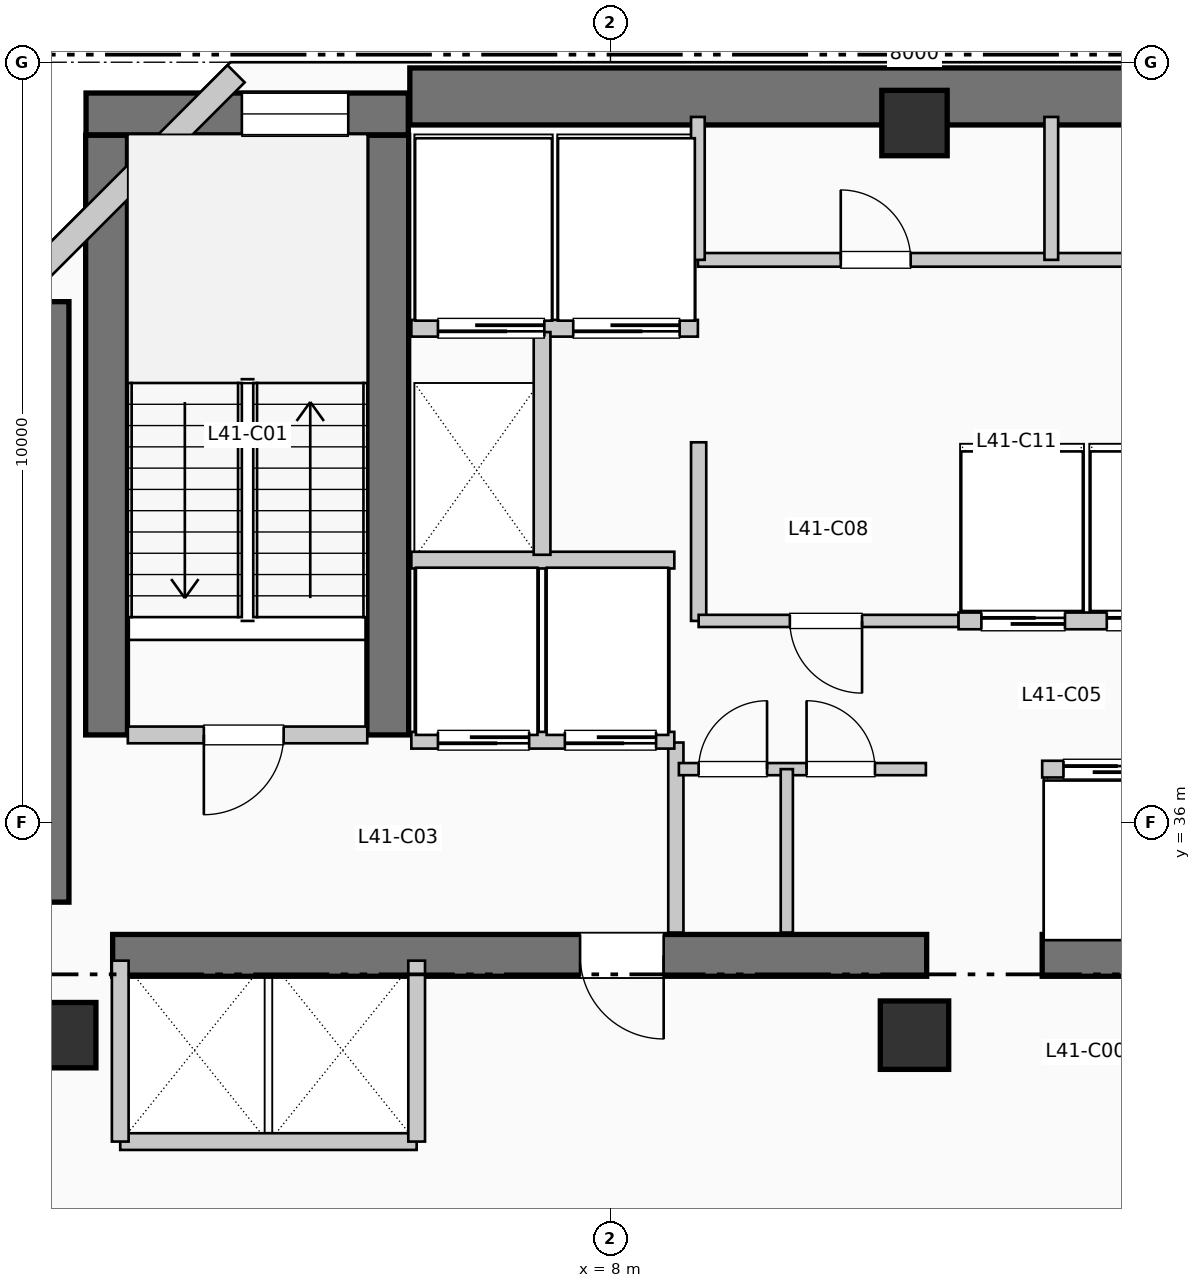
"""IFC4 building model, lengths in metres.
Left out: names, types, materials, properties, quantities, classifications, styles, units other than length and angle.
Written with IfcOpenShell. Run it as: python <this file> out.ifc"""

import sys

from ifc_helpers import new_model, si_unit, direction, frame, frame_2d, origin, origin_2d, place, context, subcontext, project, spatial, rectangle, extrude, element, fill, save


model = new_model("IFC4")
c1 = context("Model", 3, precision=1e-05, world=origin(), true_north=direction((0.0, 1.0)))
c2 = subcontext(c1, "Body", "Model", "MODEL_VIEW")
j1 = project(units=[si_unit("LENGTHUNIT", "METRE"), si_unit("PLANEANGLEUNIT", "RADIAN")], contexts=[c1])
p1 = place(None, origin())
s1 = spatial("IfcSite", under=j1, at=p1, CompositionType="ELEMENT")
p2 = place(p1, origin())
s2 = spatial("IfcBuilding", under=s1, at=p2, CompositionType="ELEMENT")
p3 = place(p2, frame((0.0, 0.0, 170.61)))
s3 = spatial("IfcBuildingStorey", under=s2, at=p3, CompositionType="ELEMENT", Elevation=170.61)
p4 = place(p3, frame((5.36, 45.55, 0.0), z_axis=(0.0, 0.0, 1.0), x_axis=(1.0, 0.0, 0.0)))
e1 = element("IfcWall", 1, at=p4, inside=s3, PredefinedType="SHEAR", context=c2, shape_type="SweptSolid", body=[
    extrude(rectangle(XDim=13.98, YDim=0.75, at=frame_2d((6.99, 0.0))), origin(), (0.0, 0.0, 1.0), 3.96),
])
p5 = place(p3, frame((0.5, 34.95, 0.0), z_axis=(0.0, 0.0, 1.0), x_axis=(0.0, 1.0, 0.0)))
e2 = element("IfcWall", 2, at=p5, inside=s3, PredefinedType="SHEAR", context=c2, shape_type="SweptSolid", body=[
    extrude(rectangle(XDim=7.9, YDim=0.75, at=frame_2d((3.95, 0.0))), origin(), (0.0, 0.0, 1.0), 3.96),
])
p6 = place(p3, frame((1.45, 34.25, 0.0), z_axis=(0.0, 0.0, 1.0), x_axis=(1.0, 0.0, 0.0)))
e3 = element("IfcWall", 3, at=p6, inside=s3, PredefinedType="SHEAR", context=c2, shape_type="SweptSolid", body=[
    extrude(rectangle(XDim=10.71, YDim=0.55, at=frame_2d((5.355, 0.0))), origin(), (0.0, 0.0, 1.0), 3.96),
])
p7 = place(p6, frame((7.25, 0.0, 0.0), z_axis=(0.0, 0.0, 1.0), x_axis=(-1.0, 0.0, 0.0)))
e4 = element("IfcOpeningElement", 4, at=p7, cuts=e3, PredefinedType="OPENING", context=c2, shape_type="SweptSolid", body=[
    extrude(rectangle(XDim=1.1, YDim=2.15, at=frame_2d((0.55, 1.075))), frame((0.0, 0.285, 0.0), z_axis=(0.0, -1.0, 0.0), x_axis=(1.0, 0.0, 0.0)), (0.0, 0.0, 1.0), 0.57),
])
p8 = place(p3, frame((13.68, 34.25, 0.0), z_axis=(0.0, 0.0, 1.0), x_axis=(1.0, 0.0, 0.0)))
e5 = element("IfcWall", 5, at=p8, inside=s3, PredefinedType="SHEAR", context=c2, shape_type="SweptSolid", body=[
    extrude(rectangle(XDim=6.12, YDim=0.55, at=frame_2d((3.06, 0.0))), origin(), (0.0, 0.0, 1.0), 3.96),
])
for number, where, z_axis, x_axis in (
    (6, (1.37, 37.15, 0.0), (0.0, 0.0, 1.0), (0.0, 1.0, 0.0)),
    (7, (5.07, 37.15, 0.0), (0.0, 0.0, 1.0), (0.0, 1.0, 0.0)),
):
    element("IfcWall", number, at=place(p3, frame(where, z_axis=z_axis, x_axis=x_axis)), inside=s3, PredefinedType="SHEAR", context=c2, shape_type="SweptSolid", body=[
        extrude(rectangle(XDim=7.89, YDim=0.55, at=frame_2d((3.945, 0.0))), origin(), (0.0, 0.0, 1.0), 3.96),
    ])
p9 = place(p3, frame((1.1, 45.32, 0.0), z_axis=(0.0, 0.0, 1.0), x_axis=(1.0, 0.0, 0.0)))
e8 = element("IfcWall", 8, at=p9, inside=s3, PredefinedType="SHEAR", context=c2, shape_type="SweptSolid", body=[
    extrude(rectangle(XDim=4.24, YDim=0.55, at=frame_2d((2.12, 0.0))), origin(), (0.0, 0.0, 1.0), 3.96),
])
p10 = place(p9, frame((2.05, 0.0, 1.05)))
e9 = element("IfcOpeningElement", 9, at=p10, cuts=e8, PredefinedType="OPENING", context=c2, shape_type="SweptSolid", body=[
    extrude(rectangle(XDim=1.4, YDim=1.8, at=frame_2d((0.7, 0.9))), frame((0.0, 0.285, 0.0), z_axis=(0.0, -1.0, 0.0), x_axis=(1.0, 0.0, 0.0)), (0.0, 0.0, 1.0), 0.57),
])
p11 = place(p3, frame((0.8, 33.2, 0.0), z_axis=(0.0, 0.0, 1.0), x_axis=(1.0, 0.0, 0.0)))
e10 = element("IfcColumn", 10, at=p11, inside=s3, PredefinedType="COLUMN", context=c2, shape_type="SweptSolid", body=[
    extrude(rectangle(XDim=0.86, YDim=0.86, at=origin_2d()), origin(), (0.0, 0.0, 1.0), 3.96),
])
p12 = place(p3, frame((12.0, 33.2, 0.0), z_axis=(0.0, 0.0, 1.0), x_axis=(1.0, 0.0, 0.0)))
e11 = element("IfcColumn", 11, at=p12, inside=s3, PredefinedType="COLUMN", context=c2, shape_type="SweptSolid", body=[
    extrude(rectangle(XDim=0.9, YDim=0.9, at=origin_2d()), origin(), (0.0, 0.0, 1.0), 3.96),
])
p13 = place(p3, frame((12.0, 45.2, 0.0), z_axis=(0.0, 0.0, 1.0), x_axis=(1.0, 0.0, 0.0)))
e12 = element("IfcColumn", 12, at=p13, inside=s3, PredefinedType="COLUMN", context=c2, shape_type="SweptSolid", body=[
    extrude(rectangle(XDim=0.86, YDim=0.86, at=origin_2d()), origin(), (0.0, 0.0, 1.0), 3.96),
])
p14 = place(p3, frame((3.074, 45.848, 0.0), z_axis=(0.0, 0.0, 1.0), x_axis=(-0.707106781187, -0.707106781187, 0.0)))
e13 = element("IfcWall", 13, at=p14, inside=s3, PredefinedType="SOLIDWALL", context=c2, shape_type="SweptSolid", body=[
    extrude(rectangle(XDim=4.133, YDim=0.32, at=frame_2d((2.066, 0.0))), origin(), (0.0, 0.0, 1.0), 3.61),
])
p15 = place(p3, frame((1.65, 37.15, 0.0), z_axis=(0.0, 0.0, 1.0), x_axis=(1.0, 0.0, 0.0)))
e14 = element("IfcWall", 14, at=p15, inside=s3, PredefinedType="PARTITIONING", context=c2, shape_type="SweptSolid", body=[
    extrude(rectangle(XDim=3.15, YDim=0.22, at=frame_2d((1.575, 0.0))), origin(), (0.0, 0.0, 1.0), 3.61),
])
p16 = place(p15, frame((2.05, 0.0, 0.0), z_axis=(0.0, 0.0, 1.0), x_axis=(-1.0, 0.0, 0.0)))
e15 = element("IfcOpeningElement", 15, at=p16, cuts=e14, PredefinedType="OPENING", context=c2, shape_type="SweptSolid", body=[
    extrude(rectangle(XDim=1.05, YDim=2.15, at=frame_2d((0.525, 1.075))), frame((0.0, 0.12, 0.0), z_axis=(0.0, -1.0, 0.0), x_axis=(1.0, 0.0, 0.0)), (0.0, 0.0, 1.0), 0.24),
])
p17 = place(p3, frame((8.86, 34.55, 0.0), z_axis=(0.0, 0.0, 1.0), x_axis=(0.0, 1.0, 0.0)))
e16 = element("IfcWall", 16, at=p17, inside=s3, PredefinedType="PARTITIONING", context=c2, shape_type="SweptSolid", body=[
    extrude(rectangle(XDim=2.5, YDim=0.2, at=frame_2d((1.25, 0.0))), origin(), (0.0, 0.0, 1.0), 3.61),
])
p18 = place(p3, frame((5.38, 37.08, 0.0), z_axis=(0.0, 0.0, 1.0), x_axis=(1.0, 0.0, 0.0)))
e17 = element("IfcWall", 17, at=p18, inside=s3, PredefinedType="PARTITIONING", context=c2, shape_type="SweptSolid", body=[
    extrude(rectangle(XDim=3.46, YDim=0.22, at=frame_2d((1.73, 0.0))), origin(), (0.0, 0.0, 1.0), 3.61),
])
p19 = place(p18, frame((1.55, 0.0, 0.0), z_axis=(0.0, 0.0, 1.0), x_axis=(-1.0, 0.0, 0.0)))
e18 = element("IfcOpeningElement", 18, at=p19, cuts=e17, PredefinedType="OPENING", context=c2, shape_type="SweptSolid", body=[
    extrude(rectangle(XDim=1.2, YDim=2.2, at=frame_2d((0.6, 1.1))), frame((0.0, 0.12, 0.0), z_axis=(0.0, -1.0, 0.0), x_axis=(1.0, 0.0, 0.0)), (0.0, 0.0, 1.0), 0.24),
])
p20 = place(p18, frame((3.22, 0.0, 0.0), z_axis=(0.0, 0.0, 1.0), x_axis=(-1.0, 0.0, 0.0)))
e19 = element("IfcOpeningElement", 19, at=p20, cuts=e17, PredefinedType="OPENING", context=c2, shape_type="SweptSolid", body=[
    extrude(rectangle(XDim=1.2, YDim=2.2, at=frame_2d((0.6, 1.1))), frame((0.0, 0.12, 0.0), z_axis=(0.0, -1.0, 0.0), x_axis=(1.0, 0.0, 0.0)), (0.0, 0.0, 1.0), 0.24),
])
p21 = place(p3, frame((5.38, 39.45, 0.0), z_axis=(0.0, 0.0, 1.0), x_axis=(1.0, 0.0, 0.0)))
e20 = element("IfcWall", 20, at=p21, inside=s3, PredefinedType="PARTITIONING", context=c2, shape_type="SweptSolid", body=[
    extrude(rectangle(XDim=3.46, YDim=0.22, at=frame_2d((1.73, 0.0))), origin(), (0.0, 0.0, 1.0), 3.61),
])
p22 = place(p3, frame((5.38, 42.5, 0.0), z_axis=(0.0, 0.0, 1.0), x_axis=(1.0, 0.0, 0.0)))
e21 = element("IfcWall", 21, at=p22, inside=s3, PredefinedType="PARTITIONING", context=c2, shape_type="SweptSolid", body=[
    extrude(rectangle(XDim=3.77, YDim=0.22, at=frame_2d((1.885, 0.0))), origin(), (0.0, 0.0, 1.0), 3.61),
])
p23 = place(p22, frame((1.75, 0.0, 0.0), z_axis=(0.0, 0.0, 1.0), x_axis=(-1.0, 0.0, 0.0)))
e22 = element("IfcOpeningElement", 22, at=p23, cuts=e21, PredefinedType="OPENING", context=c2, shape_type="SweptSolid", body=[
    extrude(rectangle(XDim=1.4, YDim=2.2, at=frame_2d((0.7, 1.1))), frame((0.0, 0.12, 0.0), z_axis=(0.0, -1.0, 0.0), x_axis=(1.0, 0.0, 0.0)), (0.0, 0.0, 1.0), 0.24),
])
p24 = place(p22, frame((3.53, 0.0, 0.0), z_axis=(0.0, 0.0, 1.0), x_axis=(-1.0, 0.0, 0.0)))
e23 = element("IfcOpeningElement", 23, at=p24, cuts=e21, PredefinedType="OPENING", context=c2, shape_type="SweptSolid", body=[
    extrude(rectangle(XDim=1.4, YDim=2.2, at=frame_2d((0.7, 1.1))), frame((0.0, 0.12, 0.0), z_axis=(0.0, -1.0, 0.0), x_axis=(1.0, 0.0, 0.0)), (0.0, 0.0, 1.0), 0.24),
])
p25 = place(p3, frame((7.1, 39.52, 0.0), z_axis=(0.0, 0.0, 1.0), x_axis=(0.0, 1.0, 0.0)))
e24 = element("IfcWall", 24, at=p25, inside=s3, PredefinedType="PARTITIONING", context=c2, shape_type="SweptSolid", body=[
    extrude(rectangle(XDim=2.93, YDim=0.22, at=frame_2d((1.465, 0.0))), origin(), (0.0, 0.0, 1.0), 3.61),
])
p26 = place(p3, frame((1.55, 31.8, 0.0), z_axis=(0.0, 0.0, 1.0), x_axis=(1.0, 0.0, 0.0)))
e25 = element("IfcWall", 25, at=p26, inside=s3, PredefinedType="PARTITIONING", context=c2, shape_type="SweptSolid", body=[
    extrude(rectangle(XDim=3.9, YDim=0.22, at=frame_2d((1.95, 0.0))), origin(), (0.0, 0.0, 1.0), 3.61),
])
for number, where, z_axis, x_axis in (
    (26, (1.55, 31.8, 0.0), (0.0, 0.0, 1.0), (0.0, 1.0, 0.0)),
    (27, (5.45, 31.8, 0.0), (0.0, 0.0, 1.0), (0.0, 1.0, 0.0)),
):
    element("IfcWall", number, at=place(p3, frame(where, z_axis=z_axis, x_axis=x_axis)), inside=s3, PredefinedType="PARTITIONING", context=c2, shape_type="SweptSolid", body=[
        extrude(rectangle(XDim=2.38, YDim=0.22, at=frame_2d((1.19, 0.0))), origin(), (0.0, 0.0, 1.0), 3.61),
    ])
p27 = place(p3, frame((9.16, 38.65, 0.0), z_axis=(0.0, 0.0, 1.0), x_axis=(0.0, 1.0, 0.0)))
e28 = element("IfcWall", 28, at=p27, inside=s3, PredefinedType="PARTITIONING", context=c2, shape_type="SweptSolid", body=[
    extrude(rectangle(XDim=2.35, YDim=0.2, at=frame_2d((1.175, 0.0))), origin(), (0.0, 0.0, 1.0), 3.61),
])
p28 = place(p3, frame((8.9, 36.7, 0.0), z_axis=(0.0, 0.0, 1.0), x_axis=(1.0, 0.0, 0.0)))
e29 = element("IfcWall", 29, at=p28, inside=s3, PredefinedType="PARTITIONING", context=c2, shape_type="SweptSolid", body=[
    extrude(rectangle(XDim=3.25, YDim=0.16, at=frame_2d((1.625, 0.0))), origin(), (0.0, 0.0, 1.0), 3.61),
])
p29 = place(p28, frame((0.26, 0.0, 0.0)))
e30 = element("IfcOpeningElement", 30, at=p29, cuts=e29, PredefinedType="OPENING", context=c2, shape_type="SweptSolid", body=[
    extrude(rectangle(XDim=0.9, YDim=2.15, at=frame_2d((0.45, 1.075))), frame((0.0, 0.09, 0.0), z_axis=(0.0, -1.0, 0.0), x_axis=(1.0, 0.0, 0.0)), (0.0, 0.0, 1.0), 0.18),
])
p30 = place(p28, frame((1.68, 0.0, 0.0)))
e31 = element("IfcOpeningElement", 31, at=p30, cuts=e29, PredefinedType="OPENING", context=c2, shape_type="SweptSolid", body=[
    extrude(rectangle(XDim=0.9, YDim=2.15, at=frame_2d((0.45, 1.075))), frame((0.0, 0.09, 0.0), z_axis=(0.0, -1.0, 0.0), x_axis=(1.0, 0.0, 0.0)), (0.0, 0.0, 1.0), 0.18),
])
p31 = place(p3, frame((10.32, 34.55, 0.0), z_axis=(0.0, 0.0, 1.0), x_axis=(0.0, 1.0, 0.0)))
e32 = element("IfcWall", 32, at=p31, inside=s3, PredefinedType="PARTITIONING", context=c2, shape_type="SweptSolid", body=[
    extrude(rectangle(XDim=2.15, YDim=0.16, at=frame_2d((1.075, 0.0))), origin(), (0.0, 0.0, 1.0), 3.61),
])
p32 = place(p3, frame((9.16, 38.65, 0.0), z_axis=(0.0, 0.0, 1.0), x_axis=(1.0, 0.0, 0.0)))
e33 = element("IfcWall", 33, at=p32, inside=s3, PredefinedType="PARTITIONING", context=c2, shape_type="SweptSolid", body=[
    extrude(rectangle(XDim=3.42, YDim=0.16, at=frame_2d((1.71, 0.0))), origin(), (0.0, 0.0, 1.0), 3.61),
])
p33 = place(p32, frame((2.15, 0.0, 0.0), z_axis=(0.0, 0.0, 1.0), x_axis=(-1.0, 0.0, 0.0)))
e34 = element("IfcOpeningElement", 34, at=p33, cuts=e33, PredefinedType="OPENING", context=c2, shape_type="SweptSolid", body=[
    extrude(rectangle(XDim=0.95, YDim=2.15, at=frame_2d((0.475, 1.075))), frame((0.0, 0.09, 0.0), z_axis=(0.0, -1.0, 0.0), x_axis=(1.0, 0.0, 0.0)), (0.0, 0.0, 1.0), 0.18),
])
p34 = place(p3, frame((13.68, 36.7, 0.0), z_axis=(0.0, 0.0, 1.0), x_axis=(1.0, 0.0, 0.0)))
e35 = element("IfcWall", 35, at=p34, inside=s3, PredefinedType="PARTITIONING", context=c2, shape_type="SweptSolid", body=[
    extrude(rectangle(XDim=3.28, YDim=0.22, at=frame_2d((1.64, 0.0))), origin(), (0.0, 0.0, 1.0), 3.61),
])
p35 = place(p34, frame((0.28, 0.0, 0.0)))
e36 = element("IfcOpeningElement", 36, at=p35, cuts=e35, PredefinedType="OPENING", context=c2, shape_type="SweptSolid", body=[
    extrude(rectangle(XDim=1.1, YDim=2.2, at=frame_2d((0.55, 1.1))), frame((0.0, 0.12, 0.0), z_axis=(0.0, -1.0, 0.0), x_axis=(1.0, 0.0, 0.0)), (0.0, 0.0, 1.0), 0.24),
])
p36 = place(p34, frame((1.9, 0.0, 0.0)))
e37 = element("IfcOpeningElement", 37, at=p36, cuts=e35, PredefinedType="OPENING", context=c2, shape_type="SweptSolid", body=[
    extrude(rectangle(XDim=1.1, YDim=2.2, at=frame_2d((0.55, 1.1))), frame((0.0, 0.12, 0.0), z_axis=(0.0, -1.0, 0.0), x_axis=(1.0, 0.0, 0.0)), (0.0, 0.0, 1.0), 0.24),
])
p37 = place(p3, frame((12.58, 38.65, 0.0), z_axis=(0.0, 0.0, 1.0), x_axis=(1.0, 0.0, 0.0)))
e38 = element("IfcWall", 38, at=p37, inside=s3, PredefinedType="PARTITIONING", context=c2, shape_type="SweptSolid", body=[
    extrude(rectangle(XDim=3.38, YDim=0.22, at=frame_2d((1.69, 0.0))), origin(), (0.0, 0.0, 1.0), 3.61),
])
p38 = place(p37, frame((0.3, 0.0, 0.0)))
e39 = element("IfcOpeningElement", 39, at=p38, cuts=e38, PredefinedType="OPENING", context=c2, shape_type="SweptSolid", body=[
    extrude(rectangle(XDim=1.1, YDim=2.2, at=frame_2d((0.55, 1.1))), frame((0.0, 0.12, 0.0), z_axis=(0.0, -1.0, 0.0), x_axis=(1.0, 0.0, 0.0)), (0.0, 0.0, 1.0), 0.24),
])
p39 = place(p37, frame((1.95, 0.0, 0.0)))
e40 = element("IfcOpeningElement", 40, at=p39, cuts=e38, PredefinedType="OPENING", context=c2, shape_type="SweptSolid", body=[
    extrude(rectangle(XDim=1.1, YDim=2.2, at=frame_2d((0.55, 1.1))), frame((0.0, 0.12, 0.0), z_axis=(0.0, -1.0, 0.0), x_axis=(1.0, 0.0, 0.0)), (0.0, 0.0, 1.0), 0.24),
])
p40 = place(p3, frame((9.15, 43.4, 0.0), z_axis=(0.0, 0.0, 1.0), x_axis=(1.0, 0.0, 0.0)))
e41 = element("IfcWall", 41, at=p40, inside=s3, PredefinedType="PLUMBINGWALL", context=c2, shape_type="SweptSolid", body=[
    extrude(rectangle(XDim=9.33, YDim=0.18, at=frame_2d((4.665, 0.0))), origin(), (0.0, 0.0, 1.0), 3.61),
])
p41 = place(p40, frame((1.88, 0.0, 0.0)))
e42 = element("IfcOpeningElement", 42, at=p41, cuts=e41, PredefinedType="OPENING", context=c2, shape_type="SweptSolid", body=[
    extrude(rectangle(XDim=0.92, YDim=2.1, at=frame_2d((0.46, 1.05))), frame((0.0, 0.1, 0.0), z_axis=(0.0, -1.0, 0.0), x_axis=(1.0, 0.0, 0.0)), (0.0, 0.0, 1.0), 0.2),
])
p42 = place(p40, frame((6.515, 0.0, 0.0)))
e43 = element("IfcOpeningElement", 43, at=p42, cuts=e41, PredefinedType="OPENING", context=c2, shape_type="SweptSolid", body=[
    extrude(rectangle(XDim=0.92, YDim=2.1, at=frame_2d((0.46, 1.05))), frame((0.0, 0.1, 0.0), z_axis=(0.0, -1.0, 0.0), x_axis=(1.0, 0.0, 0.0)), (0.0, 0.0, 1.0), 0.2),
])
for number, where, z_axis, x_axis in (
    (44, (9.15, 43.4, 0.0), (0.0, 0.0, 1.0), (0.0, 1.0, 0.0)),
    (45, (13.8, 43.4, 0.0), (0.0, 0.0, 1.0), (0.0, 1.0, 0.0)),
):
    element("IfcWall", number, at=place(p3, frame(where, z_axis=z_axis, x_axis=x_axis)), inside=s3, PredefinedType="PLUMBINGWALL", context=c2, shape_type="SweptSolid", body=[
        extrude(rectangle(XDim=1.88, YDim=0.18, at=frame_2d((0.94, 0.0))), origin(), (0.0, 0.0, 1.0), 3.61),
    ])
p43 = place(p10, origin())
e46 = element("IfcWindow", 46, at=p43, inside=s3, PartitioningType="SINGLE_PANEL", PredefinedType="WINDOW", context=c2, shape_type="SweptSolid", body=[
    extrude(rectangle(XDim=1.4, YDim=1.8, at=frame_2d((0.7, 0.9))), frame((0.0, 0.03, 0.0), z_axis=(0.0, -1.0, 0.0), x_axis=(1.0, 0.0, 0.0)), (0.0, 0.0, 1.0), 0.06),
])
fill(e9, e46)
p44 = place(p16, origin())
e47 = element("IfcDoor", 47, at=p44, inside=s3, OperationType="SINGLE_SWING_LEFT", PredefinedType="DOOR", context=c2, shape_type="SweptSolid", body=[
    extrude(rectangle(XDim=1.05, YDim=2.15, at=frame_2d((0.525, 1.075))), frame((0.0, 0.025, 0.0), z_axis=(0.0, -1.0, 0.0), x_axis=(1.0, 0.0, 0.0)), (0.0, 0.0, 1.0), 0.05),
])
fill(e15, e47)
p45 = place(p7, origin())
e48 = element("IfcDoor", 48, at=p45, inside=s3, OperationType="SINGLE_SWING_RIGHT", PredefinedType="DOOR", context=c2, shape_type="SweptSolid", body=[
    extrude(rectangle(XDim=1.1, YDim=2.15, at=frame_2d((0.55, 1.075))), frame((0.0, 0.025, 0.0), z_axis=(0.0, -1.0, 0.0), x_axis=(1.0, 0.0, 0.0)), (0.0, 0.0, 1.0), 0.05),
])
fill(e4, e48)
p46 = place(p19, origin())
e49 = element("IfcDoor", 49, at=p46, inside=s3, OperationType="SLIDING_TO_RIGHT", PredefinedType="DOOR", context=c2, shape_type="SweptSolid", body=[
    extrude(rectangle(XDim=1.2, YDim=2.2, at=frame_2d((0.6, 1.1))), frame((0.0, 0.025, 0.0), z_axis=(0.0, -1.0, 0.0), x_axis=(1.0, 0.0, 0.0)), (0.0, 0.0, 1.0), 0.05),
])
fill(e18, e49)
p47 = place(p20, origin())
e50 = element("IfcDoor", 50, at=p47, inside=s3, OperationType="SLIDING_TO_RIGHT", PredefinedType="DOOR", context=c2, shape_type="SweptSolid", body=[
    extrude(rectangle(XDim=1.2, YDim=2.2, at=frame_2d((0.6, 1.1))), frame((0.0, 0.025, 0.0), z_axis=(0.0, -1.0, 0.0), x_axis=(1.0, 0.0, 0.0)), (0.0, 0.0, 1.0), 0.05),
])
fill(e19, e50)
p48 = place(p23, origin())
e51 = element("IfcDoor", 51, at=p48, inside=s3, OperationType="SLIDING_TO_LEFT", PredefinedType="DOOR", context=c2, shape_type="SweptSolid", body=[
    extrude(rectangle(XDim=1.4, YDim=2.2, at=frame_2d((0.7, 1.1))), frame((0.0, 0.025, 0.0), z_axis=(0.0, -1.0, 0.0), x_axis=(1.0, 0.0, 0.0)), (0.0, 0.0, 1.0), 0.05),
])
fill(e22, e51)
p49 = place(p24, origin())
e52 = element("IfcDoor", 52, at=p49, inside=s3, OperationType="SLIDING_TO_LEFT", PredefinedType="DOOR", context=c2, shape_type="SweptSolid", body=[
    extrude(rectangle(XDim=1.4, YDim=2.2, at=frame_2d((0.7, 1.1))), frame((0.0, 0.025, 0.0), z_axis=(0.0, -1.0, 0.0), x_axis=(1.0, 0.0, 0.0)), (0.0, 0.0, 1.0), 0.05),
])
fill(e23, e52)
p50 = place(p29, origin())
e53 = element("IfcDoor", 53, at=p50, inside=s3, OperationType="SINGLE_SWING_RIGHT", PredefinedType="DOOR", context=c2, shape_type="SweptSolid", body=[
    extrude(rectangle(XDim=0.9, YDim=2.15, at=frame_2d((0.45, 1.075))), frame((0.0, 0.025, 0.0), z_axis=(0.0, -1.0, 0.0), x_axis=(1.0, 0.0, 0.0)), (0.0, 0.0, 1.0), 0.05),
])
fill(e30, e53)
p51 = place(p30, origin())
e54 = element("IfcDoor", 54, at=p51, inside=s3, OperationType="SINGLE_SWING_LEFT", PredefinedType="DOOR", context=c2, shape_type="SweptSolid", body=[
    extrude(rectangle(XDim=0.9, YDim=2.15, at=frame_2d((0.45, 1.075))), frame((0.0, 0.025, 0.0), z_axis=(0.0, -1.0, 0.0), x_axis=(1.0, 0.0, 0.0)), (0.0, 0.0, 1.0), 0.05),
])
fill(e31, e54)
p52 = place(p33, origin())
e55 = element("IfcDoor", 55, at=p52, inside=s3, OperationType="SINGLE_SWING_RIGHT", PredefinedType="DOOR", context=c2, shape_type="SweptSolid", body=[
    extrude(rectangle(XDim=0.95, YDim=2.15, at=frame_2d((0.475, 1.075))), frame((0.0, 0.025, 0.0), z_axis=(0.0, -1.0, 0.0), x_axis=(1.0, 0.0, 0.0)), (0.0, 0.0, 1.0), 0.05),
])
fill(e34, e55)
p53 = place(p35, origin())
e56 = element("IfcDoor", 56, at=p53, inside=s3, OperationType="SLIDING_TO_RIGHT", PredefinedType="DOOR", context=c2, shape_type="SweptSolid", body=[
    extrude(rectangle(XDim=1.1, YDim=2.2, at=frame_2d((0.55, 1.1))), frame((0.0, 0.025, 0.0), z_axis=(0.0, -1.0, 0.0), x_axis=(1.0, 0.0, 0.0)), (0.0, 0.0, 1.0), 0.05),
])
fill(e36, e56)
p54 = place(p38, origin())
e57 = element("IfcDoor", 57, at=p54, inside=s3, OperationType="SLIDING_TO_RIGHT", PredefinedType="DOOR", context=c2, shape_type="SweptSolid", body=[
    extrude(rectangle(XDim=1.1, YDim=2.2, at=frame_2d((0.55, 1.1))), frame((0.0, 0.025, 0.0), z_axis=(0.0, -1.0, 0.0), x_axis=(1.0, 0.0, 0.0)), (0.0, 0.0, 1.0), 0.05),
])
fill(e39, e57)
p55 = place(p39, origin())
e58 = element("IfcDoor", 58, at=p55, inside=s3, OperationType="SLIDING_TO_RIGHT", PredefinedType="DOOR", context=c2, shape_type="SweptSolid", body=[
    extrude(rectangle(XDim=1.1, YDim=2.2, at=frame_2d((0.55, 1.1))), frame((0.0, 0.025, 0.0), z_axis=(0.0, -1.0, 0.0), x_axis=(1.0, 0.0, 0.0)), (0.0, 0.0, 1.0), 0.05),
])
fill(e40, e58)
p56 = place(p41, origin())
e59 = element("IfcDoor", 59, at=p56, inside=s3, OperationType="SINGLE_SWING_LEFT", PredefinedType="DOOR", context=c2, shape_type="SweptSolid", body=[
    extrude(rectangle(XDim=0.92, YDim=2.1, at=frame_2d((0.46, 1.05))), frame((0.0, 0.025, 0.0), z_axis=(0.0, -1.0, 0.0), x_axis=(1.0, 0.0, 0.0)), (0.0, 0.0, 1.0), 0.05),
])
fill(e42, e59)
save(model, sys.argv[1])
